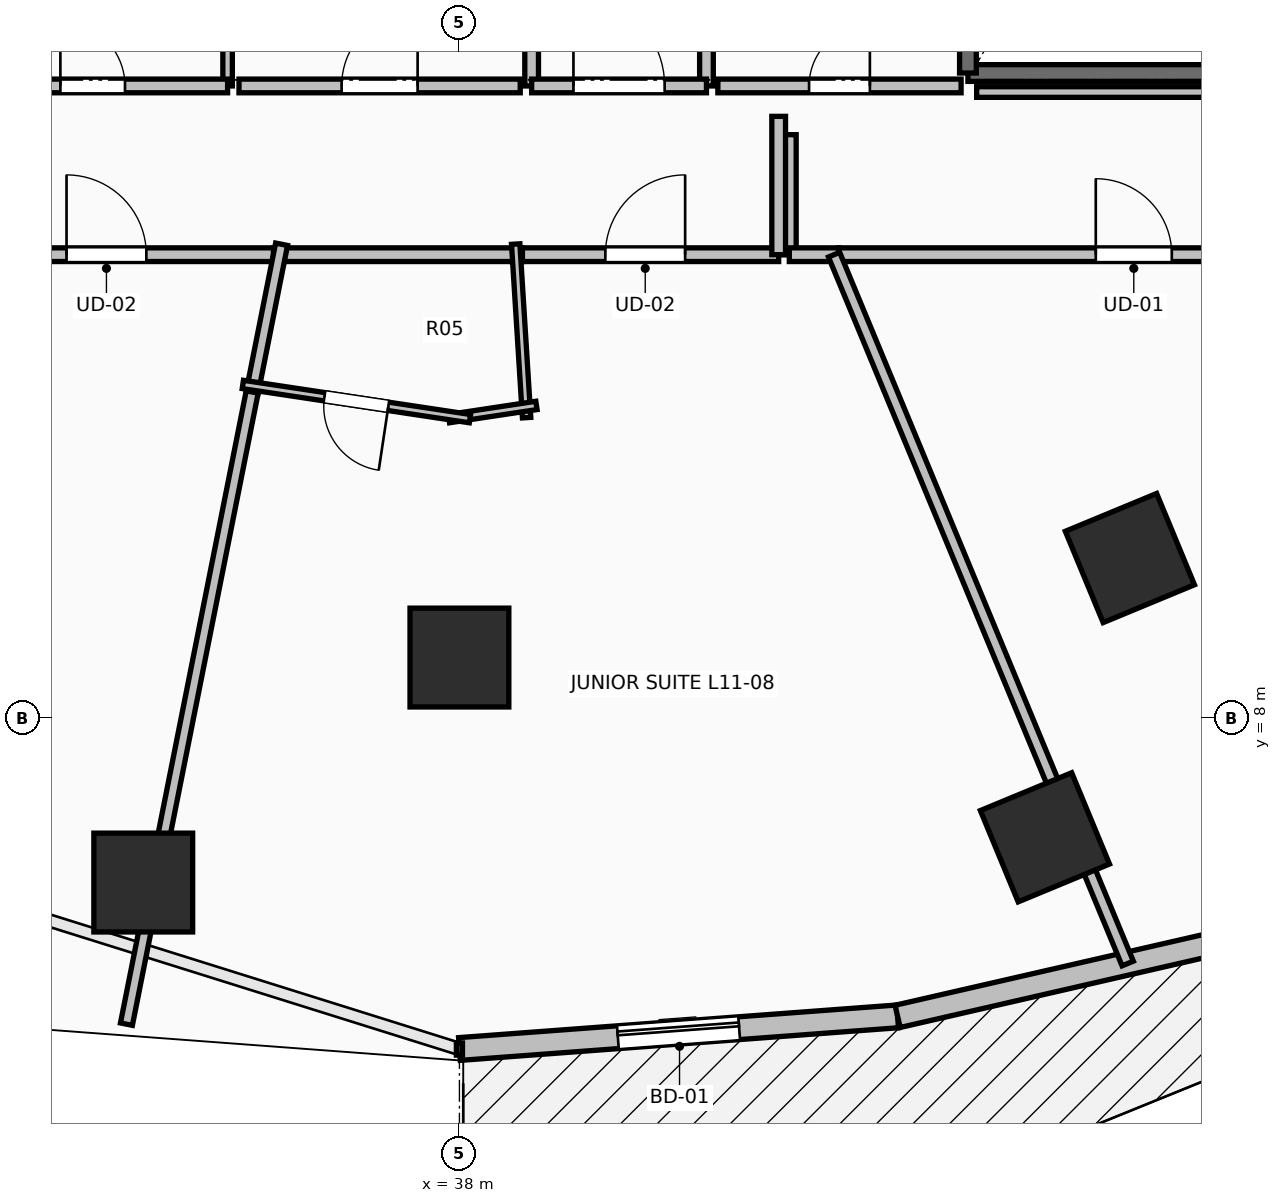
"""IFC4 building model, lengths in metres.
Left out: names, types, materials, properties, quantities, classifications, styles, units other than length and angle.
Written with IfcOpenShell. Run it as: python <this file> out.ifc"""

import sys

from ifc_helpers import new_model, si_unit, direction, frame, frame_2d, origin, origin_2d, place, context, subcontext, project, spatial, rectangle, extrude, element, fill, save


model = new_model("IFC4")
c1 = context("Model", 3, precision=1e-05, world=origin(), true_north=direction((0.0, 1.0)))
c2 = subcontext(c1, "Body", "Model", "MODEL_VIEW")
j1 = project(units=[si_unit("LENGTHUNIT", "METRE"), si_unit("PLANEANGLEUNIT", "RADIAN")], contexts=[c1])
p1 = place(None, origin())
s1 = spatial("IfcSite", under=j1, at=p1, CompositionType="ELEMENT")
p2 = place(p1, origin())
s2 = spatial("IfcBuilding", under=s1, at=p2, CompositionType="ELEMENT")
p3 = place(p2, frame((0.0, 0.0, 45.0)))
s3 = spatial("IfcBuildingStorey", under=s2, at=p3, CompositionType="ELEMENT", Elevation=45.0)
for number, where, z_axis, x_axis in (
    (1, (38.0, 8.8, 0.0), (0.0, 0.0, 1.0), (0.0, -1.0, 0.0)),
    (2, (46.821, 10.109, 0.0), (0.0, 0.0, 1.0), (0.383, -0.924, 0.0)),
    (3, (33.84, 5.84, 0.0), (0.0, 0.0, 1.0), (0.0, -1.0, 0.0)),
    (4, (45.703, 6.435, 0.0), (0.0, 0.0, 1.0), (0.383, -0.924, 0.0)),
):
    element("IfcColumn", number, at=place(p3, frame(where, z_axis=z_axis, x_axis=x_axis)), inside=s3, PredefinedType="COLUMN", context=c2, shape_type="SweptSolid", body=[
        extrude(rectangle(XDim=1.3, YDim=1.3, at=origin_2d()), origin(), (0.0, 0.0, 1.0), 3.5),
    ])
p4 = place(p3, frame((38.0, 3.65, 0.0), z_axis=(0.0, 0.0, 1.0), x_axis=(0.99723690101, 0.074287032943, 0.0)))
e5 = element("IfcWall", 5, at=p4, inside=s3, PredefinedType="STANDARD", context=c2, shape_type="SweptSolid", body=[
    extrude(rectangle(XDim=5.781, YDim=0.3, at=frame_2d((2.89, 0.0))), origin(), (0.0, 0.0, 1.0), 3.24),
])
p5 = place(p4, frame((2.09, 0.0, 0.0)))
e6 = element("IfcOpeningElement", 6, at=p5, cuts=e5, PredefinedType="OPENING", context=c2, shape_type="SweptSolid", body=[
    extrude(rectangle(XDim=1.6, YDim=2.3, at=frame_2d((0.8, 1.15))), frame((0.0, 0.165, 0.0), z_axis=(0.0, -1.0, 0.0), x_axis=(1.0, 0.0, 0.0)), (0.0, 0.0, 1.0), 0.33),
])
p6 = place(p3, frame((43.765, 4.079, 0.0), z_axis=(0.0, 0.0, 1.0), x_axis=(0.974671141646, 0.223642942305, 0.0)))
e7 = element("IfcWall", 7, at=p6, inside=s3, PredefinedType="STANDARD", context=c2, shape_type="SweptSolid", body=[
    extrude(rectangle(XDim=5.688, YDim=0.3, at=frame_2d((2.844, 0.0))), origin(), (0.0, 0.0, 1.0), 3.24),
])
p7 = place(p3, frame((48.06, 16.49, 0.0), z_axis=(0.0, 0.0, 1.0), x_axis=(-1.0, 0.0, 0.0)))
e8 = element("IfcWall", 8, at=p7, inside=s3, PredefinedType="SOLIDWALL", context=c2, shape_type="SweptSolid", body=[
    extrude(rectangle(XDim=3.37, YDim=0.22, at=frame_2d((1.685, 0.0))), origin(), (0.0, 0.0, 1.0), 3.24),
])
p8 = place(p3, frame((44.69, 16.49, 0.0), z_axis=(0.0, 0.0, 1.0), x_axis=(0.0, 1.0, 0.0)))
e9 = element("IfcWall", 9, at=p8, inside=s3, PredefinedType="SOLIDWALL", context=c2, shape_type="SweptSolid", body=[
    extrude(rectangle(XDim=7.42, YDim=0.22, at=frame_2d((3.71, 0.0))), origin(), (0.0, 0.0, 1.0), 3.24),
])
p9 = place(p3, frame((41.25, 16.32, 0.0), z_axis=(0.0, 0.0, 1.0), x_axis=(0.0, 1.0, 0.0)))
e10 = element("IfcWall", 10, at=p9, inside=s3, PredefinedType="PARTITIONING", context=c2, shape_type="SweptSolid", body=[
    extrude(rectangle(XDim=3.985, YDim=0.18, at=frame_2d((1.992, 0.0))), origin(), (0.0, 0.0, 1.0), 3.24),
])
p10 = place(p9, frame((1.593, 0.0, 0.0)))
e11 = element("IfcOpeningElement", 11, at=p10, cuts=e10, PredefinedType="OPENING", context=c2, shape_type="SweptSolid", body=[
    extrude(rectangle(XDim=0.8, YDim=2.05, at=frame_2d((0.4, 1.025))), frame((0.0, 0.105, 0.0), z_axis=(0.0, -1.0, 0.0), x_axis=(1.0, 0.0, 0.0)), (0.0, 0.0, 1.0), 0.21),
])
p11 = place(p3, frame((38.95, 21.755, 0.0), z_axis=(0.0, 0.0, 1.0), x_axis=(0.0, -1.0, 0.0)))
e12 = element("IfcWall", 12, at=p11, inside=s3, PredefinedType="PARTITIONING", context=c2, shape_type="SweptSolid", body=[
    extrude(rectangle(XDim=5.435, YDim=0.18, at=frame_2d((2.717, 0.0))), origin(), (0.0, 0.0, 1.0), 3.24),
])
p12 = place(p11, frame((2.218, 0.0, 0.0)))
e13 = element("IfcOpeningElement", 13, at=p12, cuts=e12, PredefinedType="OPENING", context=c2, shape_type="SweptSolid", body=[
    extrude(rectangle(XDim=1.0, YDim=2.15, at=frame_2d((0.5, 1.075))), frame((0.0, 0.105, 0.0), z_axis=(0.0, -1.0, 0.0), x_axis=(1.0, 0.0, 0.0)), (0.0, 0.0, 1.0), 0.21),
])
p13 = place(p3, frame((38.95, 16.32, 0.0), z_axis=(0.0, 0.0, 1.0), x_axis=(1.0, 0.0, 0.0)))
e14 = element("IfcWall", 14, at=p13, inside=s3, PredefinedType="PARTITIONING", context=c2, shape_type="SweptSolid", body=[
    extrude(rectangle(XDim=2.3, YDim=0.18, at=frame_2d((1.15, 0.0))), origin(), (0.0, 0.0, 1.0), 3.24),
])
p14 = place(p13, frame((0.55, 0.0, 0.0)))
e15 = element("IfcOpeningElement", 15, at=p14, cuts=e14, PredefinedType="OPENING", context=c2, shape_type="SweptSolid", body=[
    extrude(rectangle(XDim=1.2, YDim=2.15, at=frame_2d((0.6, 1.075))), frame((0.0, 0.105, 0.0), z_axis=(0.0, -1.0, 0.0), x_axis=(1.0, 0.0, 0.0)), (0.0, 0.0, 1.0), 0.21),
])
p15 = place(p3, frame((41.4, 16.32, 0.0), z_axis=(0.0, 0.0, 1.0), x_axis=(1.0, 0.0, 0.0)))
e16 = element("IfcWall", 16, at=p15, inside=s3, PredefinedType="PARTITIONING", context=c2, shape_type="SweptSolid", body=[
    extrude(rectangle(XDim=3.2, YDim=0.18, at=frame_2d((1.6, 0.0))), origin(), (0.0, 0.0, 1.0), 3.24),
])
p16 = place(p15, frame((1.2, 0.0, 0.0)))
e17 = element("IfcOpeningElement", 17, at=p16, cuts=e16, PredefinedType="OPENING", context=c2, shape_type="SweptSolid", body=[
    extrude(rectangle(XDim=0.8, YDim=2.05, at=frame_2d((0.4, 1.025))), frame((0.0, 0.105, 0.0), z_axis=(0.0, -1.0, 0.0), x_axis=(1.0, 0.0, 0.0)), (0.0, 0.0, 1.0), 0.21),
])
p17 = place(p3, frame((34.95, 16.32, 0.0), z_axis=(0.0, 0.0, 1.0), x_axis=(0.0, 1.0, 0.0)))
e18 = element("IfcWall", 18, at=p17, inside=s3, PredefinedType="PARTITIONING", context=c2, shape_type="SweptSolid", body=[
    extrude(rectangle(XDim=5.13, YDim=0.125, at=frame_2d((2.565, 0.0))), origin(), (0.0, 0.0, 1.0), 3.24),
])
p18 = place(p3, frame((31.4, 16.32, 0.0), z_axis=(0.0, 0.0, 1.0), x_axis=(1.0, 0.0, 0.0)))
e19 = element("IfcWall", 19, at=p18, inside=s3, PredefinedType="PARTITIONING", context=c2, shape_type="SweptSolid", body=[
    extrude(rectangle(XDim=3.55, YDim=0.18, at=frame_2d((1.775, 0.0))), origin(), (0.0, 0.0, 1.0), 3.24),
])
p19 = place(p18, frame((1.35, 0.0, 0.0)))
e20 = element("IfcOpeningElement", 20, at=p19, cuts=e19, PredefinedType="OPENING", context=c2, shape_type="SweptSolid", body=[
    extrude(rectangle(XDim=0.85, YDim=2.1, at=frame_2d((0.425, 1.05))), frame((0.0, 0.105, 0.0), z_axis=(0.0, -1.0, 0.0), x_axis=(1.0, 0.0, 0.0)), (0.0, 0.0, 1.0), 0.21),
])
p20 = place(p3, frame((35.1, 16.32, 0.0), z_axis=(0.0, 0.0, 1.0), x_axis=(1.0, 0.0, 0.0)))
e21 = element("IfcWall", 21, at=p20, inside=s3, PredefinedType="PARTITIONING", context=c2, shape_type="SweptSolid", body=[
    extrude(rectangle(XDim=3.7, YDim=0.18, at=frame_2d((1.85, 0.0))), origin(), (0.0, 0.0, 1.0), 3.24),
])
p21 = place(p20, frame((1.35, 0.0, 0.0)))
e22 = element("IfcOpeningElement", 22, at=p21, cuts=e21, PredefinedType="OPENING", context=c2, shape_type="SweptSolid", body=[
    extrude(rectangle(XDim=1.0, YDim=2.15, at=frame_2d((0.5, 1.075))), frame((0.0, 0.105, 0.0), z_axis=(0.0, -1.0, 0.0), x_axis=(1.0, 0.0, 0.0)), (0.0, 0.0, 1.0), 0.21),
])
p22 = place(p3, frame((31.019, 14.1, 0.0), z_axis=(0.0, 0.0, 1.0), x_axis=(1.0, 0.0, 0.0)))
e23 = element("IfcWall", 23, at=p22, inside=s3, PredefinedType="PARTITIONING", context=c2, shape_type="SweptSolid", body=[
    extrude(rectangle(XDim=4.674, YDim=0.18, at=frame_2d((2.337, 0.0))), origin(), (0.0, 0.0, 1.0), 3.24),
])
p23 = place(p22, frame((1.812, 0.0, 0.0)))
e24 = element("IfcOpeningElement", 24, at=p23, cuts=e23, PredefinedType="OPENING", context=c2, shape_type="SweptSolid", body=[
    extrude(rectangle(XDim=1.05, YDim=2.2, at=frame_2d((0.525, 1.1))), frame((0.0, 0.105, 0.0), z_axis=(0.0, -1.0, 0.0), x_axis=(1.0, 0.0, 0.0)), (0.0, 0.0, 1.0), 0.21),
])
p24 = place(p3, frame((42.34, 15.679, 0.0), z_axis=(0.0, 0.0, 1.0), x_axis=(0.0, -1.0, 0.0)))
e25 = element("IfcWall", 25, at=p24, inside=s3, PredefinedType="PARTITIONING", context=c2, shape_type="SweptSolid", body=[
    extrude(rectangle(XDim=1.579, YDim=0.18, at=frame_2d((0.79, 0.0))), origin(), (0.0, 0.0, 1.0), 3.24),
])
p25 = place(p3, frame((42.34, 14.1, 0.0), z_axis=(0.0, 0.0, 1.0), x_axis=(1.0, 0.0, 0.0)))
e26 = element("IfcWall", 26, at=p25, inside=s3, PredefinedType="PARTITIONING", context=c2, shape_type="SweptSolid", body=[
    extrude(rectangle(XDim=0.654, YDim=0.18, at=frame_2d((0.327, 0.0))), origin(), (0.0, 0.0, 1.0), 3.24),
])
p26 = place(p3, frame((38.689, 14.1, 0.0), z_axis=(0.0, 0.0, 1.0), x_axis=(1.0, 0.0, 0.0)))
e27 = element("IfcWall", 27, at=p26, inside=s3, PredefinedType="PARTITIONING", context=c2, shape_type="SweptSolid", body=[
    extrude(rectangle(XDim=3.511, YDim=0.18, at=frame_2d((1.755, 0.0))), origin(), (0.0, 0.0, 1.0), 3.24),
])
p27 = place(p26, frame((1.23, 0.0, 0.0)))
e28 = element("IfcOpeningElement", 28, at=p27, cuts=e27, PredefinedType="OPENING", context=c2, shape_type="SweptSolid", body=[
    extrude(rectangle(XDim=1.05, YDim=2.2, at=frame_2d((0.525, 1.1))), frame((0.0, 0.105, 0.0), z_axis=(0.0, -1.0, 0.0), x_axis=(1.0, 0.0, 0.0)), (0.0, 0.0, 1.0), 0.21),
])
p28 = place(p3, frame((42.2, 14.1, 0.0), z_axis=(0.0, 0.0, 1.0), x_axis=(0.0, 1.0, 0.0)))
e29 = element("IfcWall", 29, at=p28, inside=s3, PredefinedType="PARTITIONING", context=c2, shape_type="SweptSolid", body=[
    extrude(rectangle(XDim=1.82, YDim=0.18, at=frame_2d((0.91, 0.0))), origin(), (0.0, 0.0, 1.0), 3.24),
])
p29 = place(p3, frame((35.553, 14.1, 0.0), z_axis=(0.0, 0.0, 1.0), x_axis=(1.0, 0.0, 0.0)))
e30 = element("IfcWall", 30, at=p29, inside=s3, PredefinedType="PARTITIONING", context=c2, shape_type="SweptSolid", body=[
    extrude(rectangle(XDim=3.276, YDim=0.18, at=frame_2d((1.638, 0.0))), origin(), (0.0, 0.0, 1.0), 3.24),
])
p30 = place(p3, frame((42.994, 14.1, 0.0), z_axis=(0.0, 0.0, 1.0), x_axis=(1.0, 0.0, 0.0)))
e31 = element("IfcWall", 31, at=p30, inside=s3, PredefinedType="PARTITIONING", context=c2, shape_type="SweptSolid", body=[
    extrude(rectangle(XDim=7.756, YDim=0.18, at=frame_2d((3.878, 0.0))), origin(), (0.0, 0.0, 1.0), 2.432),
])
p31 = place(p30, frame((3.378, 0.0, 0.0)))
e32 = element("IfcOpeningElement", 32, at=p31, cuts=e31, PredefinedType="OPENING", context=c2, shape_type="SweptSolid", body=[
    extrude(rectangle(XDim=1.0, YDim=2.15, at=frame_2d((0.5, 1.075))), frame((0.0, 0.105, 0.0), z_axis=(0.0, -1.0, 0.0), x_axis=(1.0, 0.0, 0.0)), (0.0, 0.0, 1.0), 0.21),
])
p32 = place(p3, frame((33.619, 3.977, 0.0), z_axis=(0.0, 0.0, 1.0), x_axis=(0.195151937053, 0.980773022398, 0.0)))
e33 = element("IfcWall", 33, at=p32, inside=s3, PredefinedType="PARTITIONING", context=c2, shape_type="SweptSolid", body=[
    extrude(rectangle(XDim=8.62, YDim=0.16, at=frame_2d((4.31, 0.0))), origin(), (0.0, 0.0, 1.0), 2.972),
])
p33 = place(p3, frame((35.274, 12.294, 0.0), z_axis=(0.0, 0.0, 1.0), x_axis=(0.194907646023, 0.980821599233, 0.0)))
e34 = element("IfcWall", 34, at=p33, inside=s3, PredefinedType="PARTITIONING", context=c2, shape_type="SweptSolid", body=[
    extrude(rectangle(XDim=1.982, YDim=0.16, at=frame_2d((0.991, 0.0))), origin(), (0.0, 0.0, 1.0), 2.886),
])
p34 = place(p3, frame((38.74, 14.24, 0.0), z_axis=(0.0, 0.0, 1.0), x_axis=(0.062743659702, -0.998029675494, 0.0)))
e35 = element("IfcWall", 35, at=p34, inside=s3, PredefinedType="PARTITIONING", context=c2, shape_type="SweptSolid", body=[
    extrude(rectangle(XDim=2.288, YDim=0.11, at=frame_2d((1.144, 0.0))), origin(), (0.0, 0.0, 1.0), 2.886),
])
p35 = place(p3, frame((39.013, 12.117, 0.0), z_axis=(0.0, 0.0, 1.0), x_axis=(-0.988803754909, -0.14922176208, 0.0)))
e36 = element("IfcWall", 36, at=p35, inside=s3, PredefinedType="PARTITIONING", context=c2, shape_type="SweptSolid", body=[
    extrude(rectangle(XDim=1.165, YDim=0.11, at=frame_2d((0.583, 0.0))), origin(), (0.0, 0.0, 1.0), 3.24),
])
p36 = place(p3, frame((38.138, 11.943, 0.0), z_axis=(0.0, 0.0, 1.0), x_axis=(-0.988861549405, 0.148838288446, 0.0)))
e37 = element("IfcWall", 37, at=p36, inside=s3, PredefinedType="PARTITIONING", context=c2, shape_type="SweptSolid", body=[
    extrude(rectangle(XDim=3.021, YDim=0.11, at=frame_2d((1.511, 0.0))), origin(), (0.0, 0.0, 1.0), 3.24),
])
p37 = place(p36, frame((1.086, 0.0, 0.0)))
e38 = element("IfcOpeningElement", 38, at=p37, cuts=e37, PredefinedType="OPENING", context=c2, shape_type="SweptSolid", body=[
    extrude(rectangle(XDim=0.85, YDim=2.1, at=frame_2d((0.425, 1.05))), frame((0.0, 0.07, 0.0), z_axis=(0.0, -1.0, 0.0), x_axis=(1.0, 0.0, 0.0)), (0.0, 0.0, 1.0), 0.14),
])
p38 = place(p3, frame((46.792, 4.775, 0.0), z_axis=(0.0, 0.0, 1.0), x_axis=(-0.382718503749, 0.923865004689, 0.0)))
e39 = element("IfcWall", 39, at=p38, inside=s3, PredefinedType="PARTITIONING", context=c2, shape_type="SweptSolid", body=[
    extrude(rectangle(XDim=10.094, YDim=0.16, at=frame_2d((5.047, 0.0))), origin(), (0.0, 0.0, 1.0), 2.432),
])
p39 = place(p3, frame((48.55, 16.24, 0.0), z_axis=(0.0, 0.0, 1.0), x_axis=(-1.0, 0.0, 0.0)))
e40 = element("IfcWall", 40, at=p39, inside=s3, PredefinedType="PARTITIONING", context=c2, shape_type="SweptSolid", body=[
    extrude(rectangle(XDim=3.745, YDim=0.14, at=frame_2d((1.873, 0.0))), origin(), (0.0, 0.0, 1.0), 2.432),
])
p40 = place(p5, origin())
e41 = element("IfcDoor", 41, at=p40, inside=s3, OperationType="SLIDING_TO_LEFT", PredefinedType="DOOR", context=c2, shape_type="SweptSolid", body=[
    extrude(rectangle(XDim=1.6, YDim=2.3, at=frame_2d((0.8, 1.15))), frame((0.0, 0.025, 0.0), z_axis=(0.0, -1.0, 0.0), x_axis=(1.0, 0.0, 0.0)), (0.0, 0.0, 1.0), 0.05),
])
fill(e6, e41)
p41 = place(p14, origin())
e42 = element("IfcDoor", 42, at=p41, inside=s3, OperationType="SINGLE_SWING_LEFT", PredefinedType="DOOR", context=c2, shape_type="SweptSolid", body=[
    extrude(rectangle(XDim=1.2, YDim=2.15, at=frame_2d((0.6, 1.075))), frame((0.0, 0.025, 0.0), z_axis=(0.0, -1.0, 0.0), x_axis=(1.0, 0.0, 0.0)), (0.0, 0.0, 1.0), 0.05),
])
fill(e15, e42)
p42 = place(p16, origin())
e43 = element("IfcDoor", 43, at=p42, inside=s3, OperationType="SINGLE_SWING_RIGHT", PredefinedType="DOOR", context=c2, shape_type="SweptSolid", body=[
    extrude(rectangle(XDim=0.8, YDim=2.05, at=frame_2d((0.4, 1.025))), frame((0.0, 0.025, 0.0), z_axis=(0.0, -1.0, 0.0), x_axis=(1.0, 0.0, 0.0)), (0.0, 0.0, 1.0), 0.05),
])
fill(e17, e43)
p43 = place(p19, origin())
e44 = element("IfcDoor", 44, at=p43, inside=s3, OperationType="SINGLE_SWING_LEFT", PredefinedType="DOOR", context=c2, shape_type="SweptSolid", body=[
    extrude(rectangle(XDim=0.85, YDim=2.1, at=frame_2d((0.425, 1.05))), frame((0.0, 0.025, 0.0), z_axis=(0.0, -1.0, 0.0), x_axis=(1.0, 0.0, 0.0)), (0.0, 0.0, 1.0), 0.05),
])
fill(e20, e44)
p44 = place(p21, origin())
e45 = element("IfcDoor", 45, at=p44, inside=s3, OperationType="SINGLE_SWING_RIGHT", PredefinedType="DOOR", context=c2, shape_type="SweptSolid", body=[
    extrude(rectangle(XDim=1.0, YDim=2.15, at=frame_2d((0.5, 1.075))), frame((0.0, 0.025, 0.0), z_axis=(0.0, -1.0, 0.0), x_axis=(1.0, 0.0, 0.0)), (0.0, 0.0, 1.0), 0.05),
])
fill(e22, e45)
p45 = place(p23, origin())
e46 = element("IfcDoor", 46, at=p45, inside=s3, OperationType="SINGLE_SWING_LEFT", PredefinedType="DOOR", context=c2, shape_type="SweptSolid", body=[
    extrude(rectangle(XDim=1.05, YDim=2.2, at=frame_2d((0.525, 1.1))), frame((0.0, 0.025, 0.0), z_axis=(0.0, -1.0, 0.0), x_axis=(1.0, 0.0, 0.0)), (0.0, 0.0, 1.0), 0.05),
])
fill(e24, e46)
p46 = place(p27, origin())
e47 = element("IfcDoor", 47, at=p46, inside=s3, OperationType="SINGLE_SWING_RIGHT", PredefinedType="DOOR", context=c2, shape_type="SweptSolid", body=[
    extrude(rectangle(XDim=1.05, YDim=2.2, at=frame_2d((0.525, 1.1))), frame((0.0, 0.025, 0.0), z_axis=(0.0, -1.0, 0.0), x_axis=(1.0, 0.0, 0.0)), (0.0, 0.0, 1.0), 0.05),
])
fill(e28, e47)
p47 = place(p31, origin())
e48 = element("IfcDoor", 48, at=p47, inside=s3, OperationType="SINGLE_SWING_LEFT", PredefinedType="DOOR", context=c2, shape_type="SweptSolid", body=[
    extrude(rectangle(XDim=1.0, YDim=2.15, at=frame_2d((0.5, 1.075))), frame((0.0, 0.025, 0.0), z_axis=(0.0, -1.0, 0.0), x_axis=(1.0, 0.0, 0.0)), (0.0, 0.0, 1.0), 0.05),
])
fill(e32, e48)
p48 = place(p37, origin())
e49 = element("IfcDoor", 49, at=p48, inside=s3, OperationType="SINGLE_SWING_LEFT", PredefinedType="DOOR", context=c2, shape_type="SweptSolid", body=[
    extrude(rectangle(XDim=0.85, YDim=2.1, at=frame_2d((0.425, 1.05))), frame((0.0, 0.025, 0.0), z_axis=(0.0, -1.0, 0.0), x_axis=(1.0, 0.0, 0.0)), (0.0, 0.0, 1.0), 0.05),
])
fill(e38, e49)
save(model, sys.argv[1])
